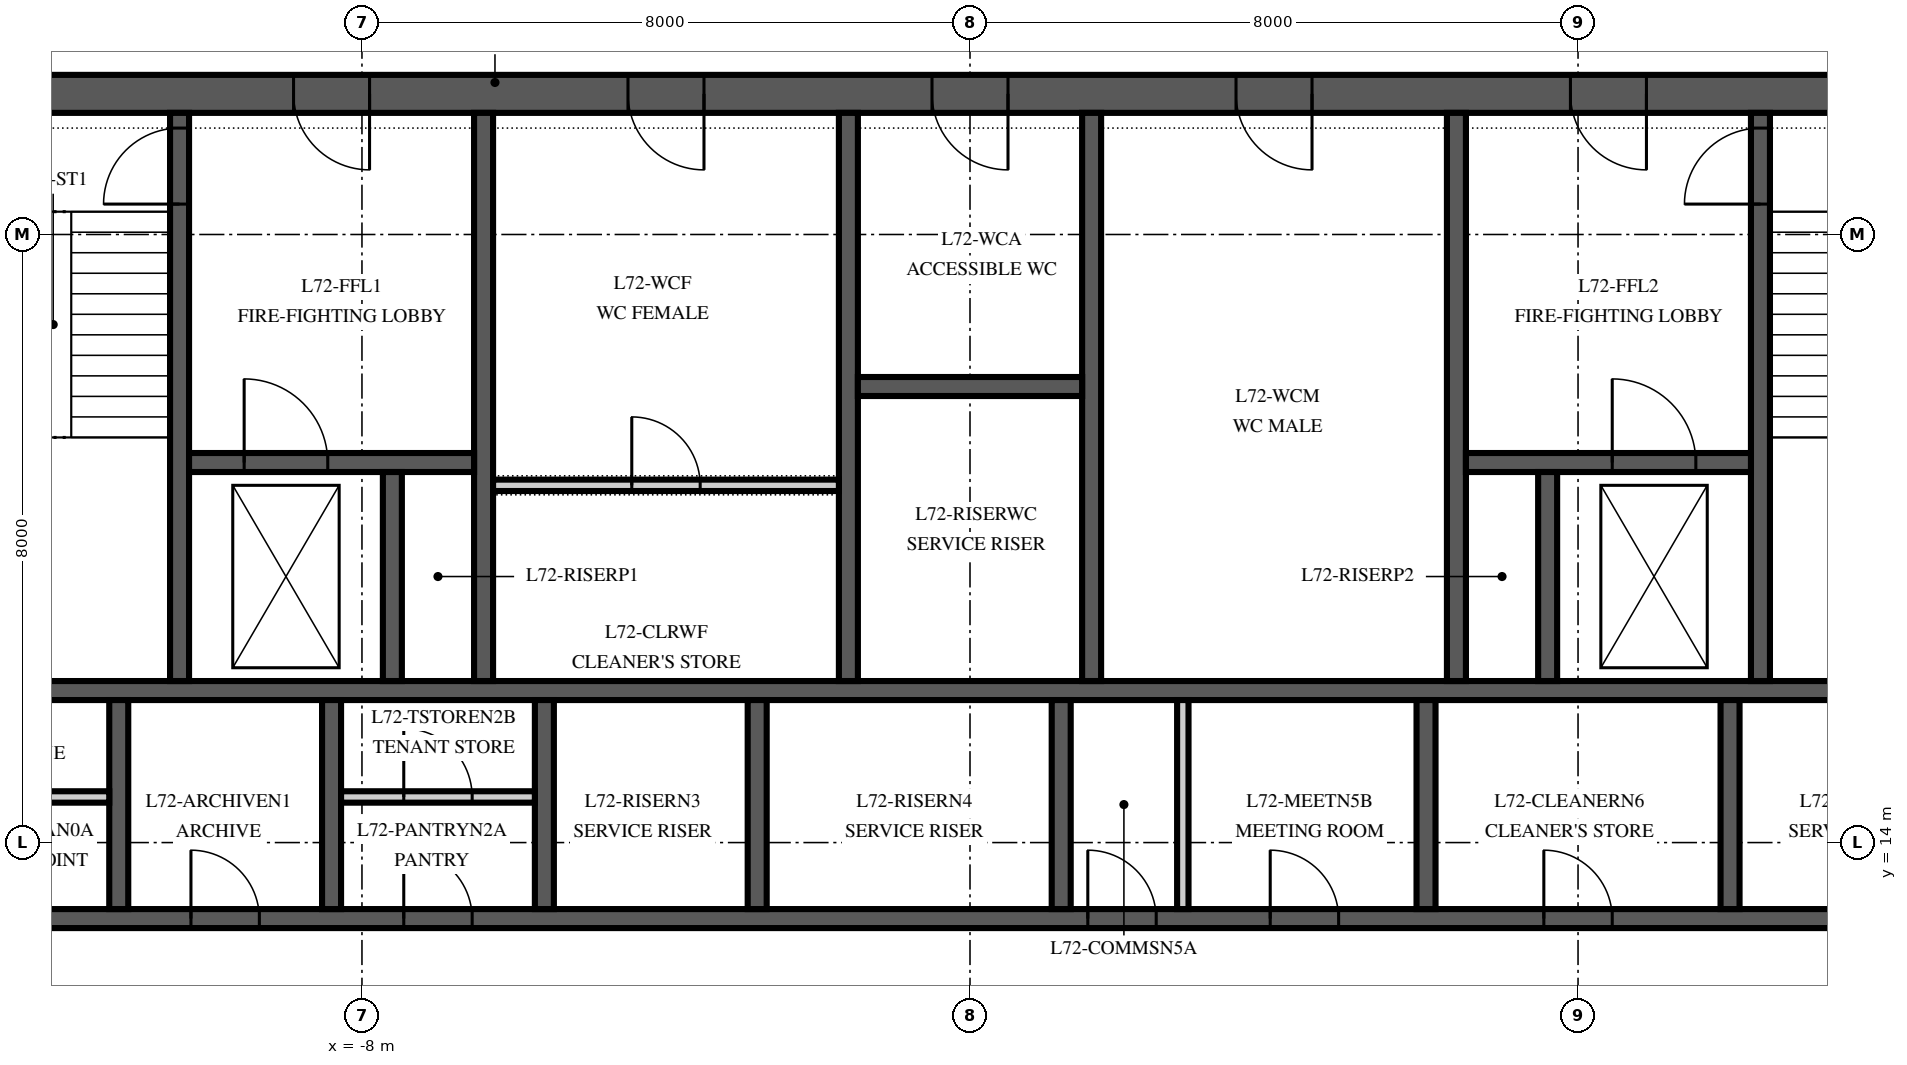
"""IFC4 building model, lengths in metres.
Left out: names, types, materials, properties, quantities, classifications, styles, units other than length and angle.
Written with IfcOpenShell. Run it as: python <this file> out.ifc"""

import sys

from ifc_helpers import new_model, si_unit, direction, frame, frame_2d, origin, place, context, subcontext, project, spatial, rectangle, extrude, element, fill, save


model = new_model("IFC4")
c1 = context("Model", 3, precision=1e-05, world=origin(), true_north=direction((0.0, 1.0)))
c2 = subcontext(c1, "Body", "Model", "MODEL_VIEW")
j1 = project(units=[si_unit("LENGTHUNIT", "METRE"), si_unit("PLANEANGLEUNIT", "RADIAN")], contexts=[c1])
p1 = place(None, origin())
s1 = spatial("IfcSite", under=j1, at=p1, CompositionType="ELEMENT")
p2 = place(p1, origin())
s2 = spatial("IfcBuilding", under=s1, at=p2, CompositionType="ELEMENT")
p3 = place(p2, frame((0.0, 0.0, 308.0)))
s3 = spatial("IfcBuildingStorey", under=s2, at=p3, CompositionType="ELEMENT", Elevation=308.0)
p4 = place(p3, frame((13.85, 23.85, 0.0), z_axis=(0.0, 0.0, 1.0), x_axis=(-1.0, 0.0, 0.0)))
e1 = element("IfcWall", 1, at=p4, inside=s3, PredefinedType="SHEAR", context=c2, shape_type="SweptSolid", body=[
    extrude(rectangle(XDim=27.7, YDim=0.5, at=frame_2d((13.85, 0.0))), origin(), (0.0, 0.0, 1.0), 4.0),
])
p5 = place(p4, frame((21.75, 0.0, 0.0)))
e2 = element("IfcOpeningElement", 2, at=p5, cuts=e1, PredefinedType="OPENING", context=c2, shape_type="SweptSolid", body=[
    extrude(rectangle(XDim=1.0, YDim=2.1, at=frame_2d((0.5, 1.05))), frame((0.0, 0.265, 0.0), z_axis=(0.0, -1.0, 0.0), x_axis=(1.0, 0.0, 0.0)), (0.0, 0.0, 1.0), 0.53),
])
p6 = place(p4, frame((4.95, 0.0, 0.0)))
e3 = element("IfcOpeningElement", 3, at=p6, cuts=e1, PredefinedType="OPENING", context=c2, shape_type="SweptSolid", body=[
    extrude(rectangle(XDim=1.0, YDim=2.1, at=frame_2d((0.5, 1.05))), frame((0.0, 0.265, 0.0), z_axis=(0.0, -1.0, 0.0), x_axis=(1.0, 0.0, 0.0)), (0.0, 0.0, 1.0), 0.53),
])
p7 = place(p4, frame((17.35, 0.0, 0.0)))
e4 = element("IfcOpeningElement", 4, at=p7, cuts=e1, PredefinedType="OPENING", context=c2, shape_type="SweptSolid", body=[
    extrude(rectangle(XDim=1.0, YDim=2.1, at=frame_2d((0.5, 1.05))), frame((0.0, 0.265, 0.0), z_axis=(0.0, -1.0, 0.0), x_axis=(1.0, 0.0, 0.0)), (0.0, 0.0, 1.0), 0.53),
])
p8 = place(p4, frame((13.35, 0.0, 0.0)))
e5 = element("IfcOpeningElement", 5, at=p8, cuts=e1, PredefinedType="OPENING", context=c2, shape_type="SweptSolid", body=[
    extrude(rectangle(XDim=1.0, YDim=2.1, at=frame_2d((0.5, 1.05))), frame((0.0, 0.265, 0.0), z_axis=(0.0, -1.0, 0.0), x_axis=(1.0, 0.0, 0.0)), (0.0, 0.0, 1.0), 0.53),
])
p9 = place(p4, frame((9.35, 0.0, 0.0)))
e6 = element("IfcOpeningElement", 6, at=p9, cuts=e1, PredefinedType="OPENING", context=c2, shape_type="SweptSolid", body=[
    extrude(rectangle(XDim=1.0, YDim=2.1, at=frame_2d((0.5, 1.05))), frame((0.0, 0.265, 0.0), z_axis=(0.0, -1.0, 0.0), x_axis=(1.0, 0.0, 0.0)), (0.0, 0.0, 1.0), 0.53),
])
p10 = place(p3, frame((-13.6, 13.0, 0.0), z_axis=(0.0, 0.0, 1.0), x_axis=(1.0, 0.0, 0.0)))
e7 = element("IfcWall", 7, at=p10, inside=s3, PredefinedType="SHEAR", context=c2, shape_type="SweptSolid", body=[
    extrude(rectangle(XDim=27.2, YDim=0.25, at=frame_2d((13.6, 0.0))), origin(), (0.0, 0.0, 1.0), 4.0),
])
p11 = place(p10, frame((15.15, 0.0, 0.0)))
e8 = element("IfcOpeningElement", 8, at=p11, cuts=e7, PredefinedType="OPENING", context=c2, shape_type="SweptSolid", body=[
    extrude(rectangle(XDim=0.9, YDim=2.1, at=frame_2d((0.45, 1.05))), frame((0.0, 0.14, 0.0), z_axis=(0.0, -1.0, 0.0), x_axis=(1.0, 0.0, 0.0)), (0.0, 0.0, 1.0), 0.28),
])
p12 = place(p10, frame((17.55, 0.0, 0.0)))
e9 = element("IfcOpeningElement", 9, at=p12, cuts=e7, PredefinedType="OPENING", context=c2, shape_type="SweptSolid", body=[
    extrude(rectangle(XDim=0.9, YDim=2.1, at=frame_2d((0.45, 1.05))), frame((0.0, 0.14, 0.0), z_axis=(0.0, -1.0, 0.0), x_axis=(1.0, 0.0, 0.0)), (0.0, 0.0, 1.0), 0.28),
])
p13 = place(p10, frame((21.15, 0.0, 0.0)))
e10 = element("IfcOpeningElement", 10, at=p13, cuts=e7, PredefinedType="OPENING", context=c2, shape_type="SweptSolid", body=[
    extrude(rectangle(XDim=0.9, YDim=2.1, at=frame_2d((0.45, 1.05))), frame((0.0, 0.14, 0.0), z_axis=(0.0, -1.0, 0.0), x_axis=(1.0, 0.0, 0.0)), (0.0, 0.0, 1.0), 0.28),
])
p14 = place(p10, frame((0.55, 0.0, 0.0)))
e11 = element("IfcOpeningElement", 11, at=p14, cuts=e7, PredefinedType="OPENING", context=c2, shape_type="SweptSolid", body=[
    extrude(rectangle(XDim=0.9, YDim=2.1, at=frame_2d((0.45, 1.05))), frame((0.0, 0.14, 0.0), z_axis=(0.0, -1.0, 0.0), x_axis=(1.0, 0.0, 0.0)), (0.0, 0.0, 1.0), 0.28),
])
p15 = place(p10, frame((3.35, 0.0, 0.0)))
e12 = element("IfcOpeningElement", 12, at=p15, cuts=e7, PredefinedType="OPENING", context=c2, shape_type="SweptSolid", body=[
    extrude(rectangle(XDim=0.9, YDim=2.1, at=frame_2d((0.45, 1.05))), frame((0.0, 0.14, 0.0), z_axis=(0.0, -1.0, 0.0), x_axis=(1.0, 0.0, 0.0)), (0.0, 0.0, 1.0), 0.28),
])
p16 = place(p10, frame((6.15, 0.0, 0.0)))
e13 = element("IfcOpeningElement", 13, at=p16, cuts=e7, PredefinedType="OPENING", context=c2, shape_type="SweptSolid", body=[
    extrude(rectangle(XDim=0.9, YDim=2.1, at=frame_2d((0.45, 1.05))), frame((0.0, 0.14, 0.0), z_axis=(0.0, -1.0, 0.0), x_axis=(1.0, 0.0, 0.0)), (0.0, 0.0, 1.0), 0.28),
])
p17 = place(p3, frame((-13.6, 16.0, 0.0), z_axis=(0.0, 0.0, 1.0), x_axis=(1.0, 0.0, 0.0)))
e14 = element("IfcWall", 14, at=p17, inside=s3, PredefinedType="SHEAR", context=c2, shape_type="SweptSolid", body=[
    extrude(rectangle(XDim=27.2, YDim=0.25, at=frame_2d((13.6, 0.0))), origin(), (0.0, 0.0, 1.0), 4.0),
])
for number, where, z_axis, x_axis in (
    (15, (-11.2, 13.125, 0.0), (0.0, 0.0, 1.0), (0.0, 1.0, 0.0)),
    (16, (-8.4, 13.125, 0.0), (0.0, 0.0, 1.0), (0.0, 1.0, 0.0)),
    (17, (-5.6, 13.125, 0.0), (0.0, 0.0, 1.0), (0.0, 1.0, 0.0)),
    (18, (-2.8, 13.125, 0.0), (0.0, 0.0, 1.0), (0.0, 1.0, 0.0)),
    (19, (1.2, 13.125, 0.0), (0.0, 0.0, 1.0), (0.0, 1.0, 0.0)),
    (20, (6.0, 13.125, 0.0), (0.0, 0.0, 1.0), (0.0, 1.0, 0.0)),
    (21, (10.0, 13.125, 0.0), (0.0, 0.0, 1.0), (0.0, 1.0, 0.0)),
):
    element("IfcWall", number, at=place(p3, frame(where, z_axis=z_axis, x_axis=x_axis)), inside=s3, PredefinedType="SHEAR", context=c2, shape_type="SweptSolid", body=[
        extrude(rectangle(XDim=2.75, YDim=0.25, at=frame_2d((1.375, 0.0))), origin(), (0.0, 0.0, 1.0), 4.0),
    ])
p18 = place(p3, frame((-10.4, 16.125, 0.0), z_axis=(0.0, 0.0, 1.0), x_axis=(0.0, 1.0, 0.0)))
e22 = element("IfcWall", 22, at=p18, inside=s3, PredefinedType="SHEAR", context=c2, shape_type="SweptSolid", body=[
    extrude(rectangle(XDim=7.475, YDim=0.25, at=frame_2d((3.738, 0.0))), origin(), (0.0, 0.0, 1.0), 4.0),
])
p19 = place(p18, frame((6.275, 0.0, 0.0)))
e23 = element("IfcOpeningElement", 23, at=p19, cuts=e22, PredefinedType="OPENING", context=c2, shape_type="SweptSolid", body=[
    extrude(rectangle(XDim=1.0, YDim=2.1, at=frame_2d((0.5, 1.05))), frame((0.0, 0.14, 0.0), z_axis=(0.0, -1.0, 0.0), x_axis=(1.0, 0.0, 0.0)), (0.0, 0.0, 1.0), 0.28),
])
for number, where, z_axis, x_axis in (
    (24, (-6.4, 16.125, 0.0), (0.0, 0.0, 1.0), (0.0, 1.0, 0.0)),
    (25, (-1.6, 16.125, 0.0), (0.0, 0.0, 1.0), (0.0, 1.0, 0.0)),
    (26, (1.6, 16.125, 0.0), (0.0, 0.0, 1.0), (0.0, 1.0, 0.0)),
    (27, (6.4, 16.125, 0.0), (0.0, 0.0, 1.0), (0.0, 1.0, 0.0)),
):
    element("IfcWall", number, at=place(p3, frame(where, z_axis=z_axis, x_axis=x_axis)), inside=s3, PredefinedType="SHEAR", context=c2, shape_type="SweptSolid", body=[
        extrude(rectangle(XDim=7.475, YDim=0.25, at=frame_2d((3.738, 0.0))), origin(), (0.0, 0.0, 1.0), 4.0),
    ])
p20 = place(p3, frame((10.4, 16.125, 0.0), z_axis=(0.0, 0.0, 1.0), x_axis=(0.0, 1.0, 0.0)))
e28 = element("IfcWall", 28, at=p20, inside=s3, PredefinedType="SHEAR", context=c2, shape_type="SweptSolid", body=[
    extrude(rectangle(XDim=7.475, YDim=0.25, at=frame_2d((3.738, 0.0))), origin(), (0.0, 0.0, 1.0), 4.0),
])
p21 = place(p20, frame((6.275, 0.0, 0.0)))
e29 = element("IfcOpeningElement", 29, at=p21, cuts=e28, PredefinedType="OPENING", context=c2, shape_type="SweptSolid", body=[
    extrude(rectangle(XDim=1.0, YDim=2.1, at=frame_2d((0.5, 1.05))), frame((0.0, 0.14, 0.0), z_axis=(0.0, -1.0, 0.0), x_axis=(1.0, 0.0, 0.0)), (0.0, 0.0, 1.0), 0.28),
])
p22 = place(p3, frame((-10.275, 19.0, 0.0), z_axis=(0.0, 0.0, 1.0), x_axis=(1.0, 0.0, 0.0)))
e30 = element("IfcWall", 30, at=p22, inside=s3, PredefinedType="SHEAR", context=c2, shape_type="SweptSolid", body=[
    extrude(rectangle(XDim=3.75, YDim=0.25, at=frame_2d((1.875, 0.0))), origin(), (0.0, 0.0, 1.0), 4.0),
])
p23 = place(p22, frame((0.725, 0.0, 0.0)))
e31 = element("IfcOpeningElement", 31, at=p23, cuts=e30, PredefinedType="OPENING", context=c2, shape_type="SweptSolid", body=[
    extrude(rectangle(XDim=1.1, YDim=2.1, at=frame_2d((0.55, 1.05))), frame((0.0, 0.14, 0.0), z_axis=(0.0, -1.0, 0.0), x_axis=(1.0, 0.0, 0.0)), (0.0, 0.0, 1.0), 0.28),
])
p24 = place(p3, frame((6.525, 19.0, 0.0), z_axis=(0.0, 0.0, 1.0), x_axis=(1.0, 0.0, 0.0)))
e32 = element("IfcWall", 32, at=p24, inside=s3, PredefinedType="SHEAR", context=c2, shape_type="SweptSolid", body=[
    extrude(rectangle(XDim=3.75, YDim=0.25, at=frame_2d((1.875, 0.0))), origin(), (0.0, 0.0, 1.0), 4.0),
])
p25 = place(p24, frame((1.925, 0.0, 0.0)))
e33 = element("IfcOpeningElement", 33, at=p25, cuts=e32, PredefinedType="OPENING", context=c2, shape_type="SweptSolid", body=[
    extrude(rectangle(XDim=1.1, YDim=2.1, at=frame_2d((0.55, 1.05))), frame((0.0, 0.14, 0.0), z_axis=(0.0, -1.0, 0.0), x_axis=(1.0, 0.0, 0.0)), (0.0, 0.0, 1.0), 0.28),
])
for number, where, z_axis, x_axis in (
    (34, (-7.6, 16.125, 0.0), (0.0, 0.0, 1.0), (0.0, 1.0, 0.0)),
    (35, (7.6, 16.125, 0.0), (0.0, 0.0, 1.0), (0.0, 1.0, 0.0)),
):
    element("IfcWall", number, at=place(p3, frame(where, z_axis=z_axis, x_axis=x_axis)), inside=s3, PredefinedType="SHEAR", context=c2, shape_type="SweptSolid", body=[
        extrude(rectangle(XDim=2.75, YDim=0.25, at=frame_2d((1.375, 0.0))), origin(), (0.0, 0.0, 1.0), 4.0),
    ])
p26 = place(p3, frame((-1.475, 20.0, 0.0), z_axis=(0.0, 0.0, 1.0), x_axis=(1.0, 0.0, 0.0)))
e36 = element("IfcWall", 36, at=p26, inside=s3, PredefinedType="SHEAR", context=c2, shape_type="SweptSolid", body=[
    extrude(rectangle(XDim=2.95, YDim=0.25, at=frame_2d((1.475, 0.0))), origin(), (0.0, 0.0, 1.0), 4.0),
])
p27 = place(p3, frame((-6.275, 18.7, 0.0), z_axis=(0.0, 0.0, 1.0), x_axis=(1.0, 0.0, 0.0)))
e37 = element("IfcWall", 37, at=p27, inside=s3, PredefinedType="PARTITIONING", context=c2, shape_type="SweptSolid", body=[
    extrude(rectangle(XDim=4.55, YDim=0.15, at=frame_2d((2.275, 0.0))), origin(), (0.0, 0.0, 1.0), 3.85),
])
p28 = place(p27, frame((1.825, 0.0, 0.0)))
e38 = element("IfcOpeningElement", 38, at=p28, cuts=e37, PredefinedType="OPENING", context=c2, shape_type="SweptSolid", body=[
    extrude(rectangle(XDim=0.9, YDim=2.1, at=frame_2d((0.45, 1.05))), frame((0.0, 0.09, 0.0), z_axis=(0.0, -1.0, 0.0), x_axis=(1.0, 0.0, 0.0)), (0.0, 0.0, 1.0), 0.18),
])
p29 = place(p3, frame((2.8, 13.125, 0.0), z_axis=(0.0, 0.0, 1.0), x_axis=(0.0, 1.0, 0.0)))
e39 = element("IfcWall", 39, at=p29, inside=s3, PredefinedType="PARTITIONING", context=c2, shape_type="SweptSolid", body=[
    extrude(rectangle(XDim=2.75, YDim=0.15, at=frame_2d((1.375, 0.0))), origin(), (0.0, 0.0, 1.0), 3.85),
])
p30 = place(p3, frame((-13.6, 14.6, 0.0), z_axis=(0.0, 0.0, 1.0), x_axis=(1.0, 0.0, 0.0)))
e40 = element("IfcWall", 40, at=p30, inside=s3, PredefinedType="PARTITIONING", context=c2, shape_type="SweptSolid", body=[
    extrude(rectangle(XDim=2.275, YDim=0.15, at=frame_2d((1.138, 0.0))), origin(), (0.0, 0.0, 1.0), 3.85),
])
p31 = place(p30, frame((0.55, 0.0, 0.0)))
e41 = element("IfcOpeningElement", 41, at=p31, cuts=e40, PredefinedType="OPENING", context=c2, shape_type="SweptSolid", body=[
    extrude(rectangle(XDim=0.9, YDim=2.1, at=frame_2d((0.45, 1.05))), frame((0.0, 0.09, 0.0), z_axis=(0.0, -1.0, 0.0), x_axis=(1.0, 0.0, 0.0)), (0.0, 0.0, 1.0), 0.18),
])
p32 = place(p3, frame((-8.275, 14.6, 0.0), z_axis=(0.0, 0.0, 1.0), x_axis=(1.0, 0.0, 0.0)))
e42 = element("IfcWall", 42, at=p32, inside=s3, PredefinedType="PARTITIONING", context=c2, shape_type="SweptSolid", body=[
    extrude(rectangle(XDim=2.55, YDim=0.15, at=frame_2d((1.275, 0.0))), origin(), (0.0, 0.0, 1.0), 3.85),
])
p33 = place(p32, frame((0.825, 0.0, 0.0)))
e43 = element("IfcOpeningElement", 43, at=p33, cuts=e42, PredefinedType="OPENING", context=c2, shape_type="SweptSolid", body=[
    extrude(rectangle(XDim=0.9, YDim=2.1, at=frame_2d((0.45, 1.05))), frame((0.0, 0.09, 0.0), z_axis=(0.0, -1.0, 0.0), x_axis=(1.0, 0.0, 0.0)), (0.0, 0.0, 1.0), 0.18),
])
p34 = place(p5, origin())
e44 = element("IfcDoor", 44, at=p34, inside=s3, OperationType="SINGLE_SWING_RIGHT", PredefinedType="DOOR", context=c2, shape_type="SweptSolid", body=[
    extrude(rectangle(XDim=1.0, YDim=2.1, at=frame_2d((0.5, 1.05))), frame((0.0, 0.25, 0.0), z_axis=(0.0, -1.0, 0.0), x_axis=(1.0, 0.0, 0.0)), (0.0, 0.0, 1.0), 0.5),
])
fill(e2, e44)
p35 = place(p6, origin())
e45 = element("IfcDoor", 45, at=p35, inside=s3, OperationType="SINGLE_SWING_RIGHT", PredefinedType="DOOR", context=c2, shape_type="SweptSolid", body=[
    extrude(rectangle(XDim=1.0, YDim=2.1, at=frame_2d((0.5, 1.05))), frame((0.0, 0.25, 0.0), z_axis=(0.0, -1.0, 0.0), x_axis=(1.0, 0.0, 0.0)), (0.0, 0.0, 1.0), 0.5),
])
fill(e3, e45)
p36 = place(p7, origin())
e46 = element("IfcDoor", 46, at=p36, inside=s3, OperationType="SINGLE_SWING_LEFT", PredefinedType="DOOR", context=c2, shape_type="SweptSolid", body=[
    extrude(rectangle(XDim=1.0, YDim=2.1, at=frame_2d((0.5, 1.05))), frame((0.0, 0.25, 0.0), z_axis=(0.0, -1.0, 0.0), x_axis=(1.0, 0.0, 0.0)), (0.0, 0.0, 1.0), 0.5),
])
fill(e4, e46)
p37 = place(p8, origin())
e47 = element("IfcDoor", 47, at=p37, inside=s3, OperationType="SINGLE_SWING_LEFT", PredefinedType="DOOR", context=c2, shape_type="SweptSolid", body=[
    extrude(rectangle(XDim=1.0, YDim=2.1, at=frame_2d((0.5, 1.05))), frame((0.0, 0.25, 0.0), z_axis=(0.0, -1.0, 0.0), x_axis=(1.0, 0.0, 0.0)), (0.0, 0.0, 1.0), 0.5),
])
fill(e5, e47)
p38 = place(p9, origin())
e48 = element("IfcDoor", 48, at=p38, inside=s3, OperationType="SINGLE_SWING_LEFT", PredefinedType="DOOR", context=c2, shape_type="SweptSolid", body=[
    extrude(rectangle(XDim=1.0, YDim=2.1, at=frame_2d((0.5, 1.05))), frame((0.0, 0.25, 0.0), z_axis=(0.0, -1.0, 0.0), x_axis=(1.0, 0.0, 0.0)), (0.0, 0.0, 1.0), 0.5),
])
fill(e6, e48)
p39 = place(p19, origin())
e49 = element("IfcDoor", 49, at=p39, inside=s3, OperationType="SINGLE_SWING_LEFT", PredefinedType="DOOR", context=c2, shape_type="SweptSolid", body=[
    extrude(rectangle(XDim=1.0, YDim=2.1, at=frame_2d((0.5, 1.05))), frame((0.0, 0.125, 0.0), z_axis=(0.0, -1.0, 0.0), x_axis=(1.0, 0.0, 0.0)), (0.0, 0.0, 1.0), 0.25),
])
fill(e23, e49)
p40 = place(p21, origin())
e50 = element("IfcDoor", 50, at=p40, inside=s3, OperationType="SINGLE_SWING_LEFT", PredefinedType="DOOR", context=c2, shape_type="SweptSolid", body=[
    extrude(rectangle(XDim=1.0, YDim=2.1, at=frame_2d((0.5, 1.05))), frame((0.0, 0.125, 0.0), z_axis=(0.0, -1.0, 0.0), x_axis=(1.0, 0.0, 0.0)), (0.0, 0.0, 1.0), 0.25),
])
fill(e29, e50)
p41 = place(p25, origin())
e51 = element("IfcDoor", 51, at=p41, inside=s3, OperationType="SLIDING_TO_RIGHT", PredefinedType="DOOR", context=c2, shape_type="SweptSolid", body=[
    extrude(rectangle(XDim=1.1, YDim=2.1, at=frame_2d((0.55, 1.05))), frame((0.0, 0.125, 0.0), z_axis=(0.0, -1.0, 0.0), x_axis=(1.0, 0.0, 0.0)), (0.0, 0.0, 1.0), 0.25),
])
fill(e33, e51)
p42 = place(p23, origin())
e52 = element("IfcDoor", 52, at=p42, inside=s3, OperationType="SLIDING_TO_RIGHT", PredefinedType="DOOR", context=c2, shape_type="SweptSolid", body=[
    extrude(rectangle(XDim=1.1, YDim=2.1, at=frame_2d((0.55, 1.05))), frame((0.0, 0.125, 0.0), z_axis=(0.0, -1.0, 0.0), x_axis=(1.0, 0.0, 0.0)), (0.0, 0.0, 1.0), 0.25),
])
fill(e31, e52)
p43 = place(p11, origin())
e53 = element("IfcDoor", 53, at=p43, inside=s3, OperationType="SINGLE_SWING_LEFT", PredefinedType="DOOR", context=c2, shape_type="SweptSolid", body=[
    extrude(rectangle(XDim=0.9, YDim=2.1, at=frame_2d((0.45, 1.05))), frame((0.0, 0.125, 0.0), z_axis=(0.0, -1.0, 0.0), x_axis=(1.0, 0.0, 0.0)), (0.0, 0.0, 1.0), 0.25),
])
fill(e8, e53)
p44 = place(p12, origin())
e54 = element("IfcDoor", 54, at=p44, inside=s3, OperationType="SINGLE_SWING_LEFT", PredefinedType="DOOR", context=c2, shape_type="SweptSolid", body=[
    extrude(rectangle(XDim=0.9, YDim=2.1, at=frame_2d((0.45, 1.05))), frame((0.0, 0.125, 0.0), z_axis=(0.0, -1.0, 0.0), x_axis=(1.0, 0.0, 0.0)), (0.0, 0.0, 1.0), 0.25),
])
fill(e9, e54)
p45 = place(p13, origin())
e55 = element("IfcDoor", 55, at=p45, inside=s3, OperationType="SINGLE_SWING_LEFT", PredefinedType="DOOR", context=c2, shape_type="SweptSolid", body=[
    extrude(rectangle(XDim=0.9, YDim=2.1, at=frame_2d((0.45, 1.05))), frame((0.0, 0.125, 0.0), z_axis=(0.0, -1.0, 0.0), x_axis=(1.0, 0.0, 0.0)), (0.0, 0.0, 1.0), 0.25),
])
fill(e10, e55)
p46 = place(p15, origin())
e56 = element("IfcDoor", 56, at=p46, inside=s3, OperationType="SINGLE_SWING_LEFT", PredefinedType="DOOR", context=c2, shape_type="SweptSolid", body=[
    extrude(rectangle(XDim=0.9, YDim=2.1, at=frame_2d((0.45, 1.05))), frame((0.0, 0.125, 0.0), z_axis=(0.0, -1.0, 0.0), x_axis=(1.0, 0.0, 0.0)), (0.0, 0.0, 1.0), 0.25),
])
fill(e12, e56)
p47 = place(p16, origin())
e57 = element("IfcDoor", 57, at=p47, inside=s3, OperationType="SINGLE_SWING_LEFT", PredefinedType="DOOR", context=c2, shape_type="SweptSolid", body=[
    extrude(rectangle(XDim=0.9, YDim=2.1, at=frame_2d((0.45, 1.05))), frame((0.0, 0.125, 0.0), z_axis=(0.0, -1.0, 0.0), x_axis=(1.0, 0.0, 0.0)), (0.0, 0.0, 1.0), 0.25),
])
fill(e13, e57)
p48 = place(p33, origin())
e58 = element("IfcDoor", 58, at=p48, inside=s3, OperationType="SINGLE_SWING_LEFT", PredefinedType="DOOR", context=c2, shape_type="SweptSolid", body=[
    extrude(rectangle(XDim=0.9, YDim=2.1, at=frame_2d((0.45, 1.05))), frame((0.0, 0.075, 0.0), z_axis=(0.0, -1.0, 0.0), x_axis=(1.0, 0.0, 0.0)), (0.0, 0.0, 1.0), 0.149),
])
fill(e43, e58)
p49 = place(p28, origin())
e59 = element("IfcDoor", 59, at=p49, inside=s3, OperationType="SINGLE_SWING_LEFT", PredefinedType="DOOR", context=c2, shape_type="SweptSolid", body=[
    extrude(rectangle(XDim=0.9, YDim=2.1, at=frame_2d((0.45, 1.05))), frame((0.0, 0.075, 0.0), z_axis=(0.0, -1.0, 0.0), x_axis=(1.0, 0.0, 0.0)), (0.0, 0.0, 1.0), 0.149),
])
fill(e38, e59)
save(model, sys.argv[1])
